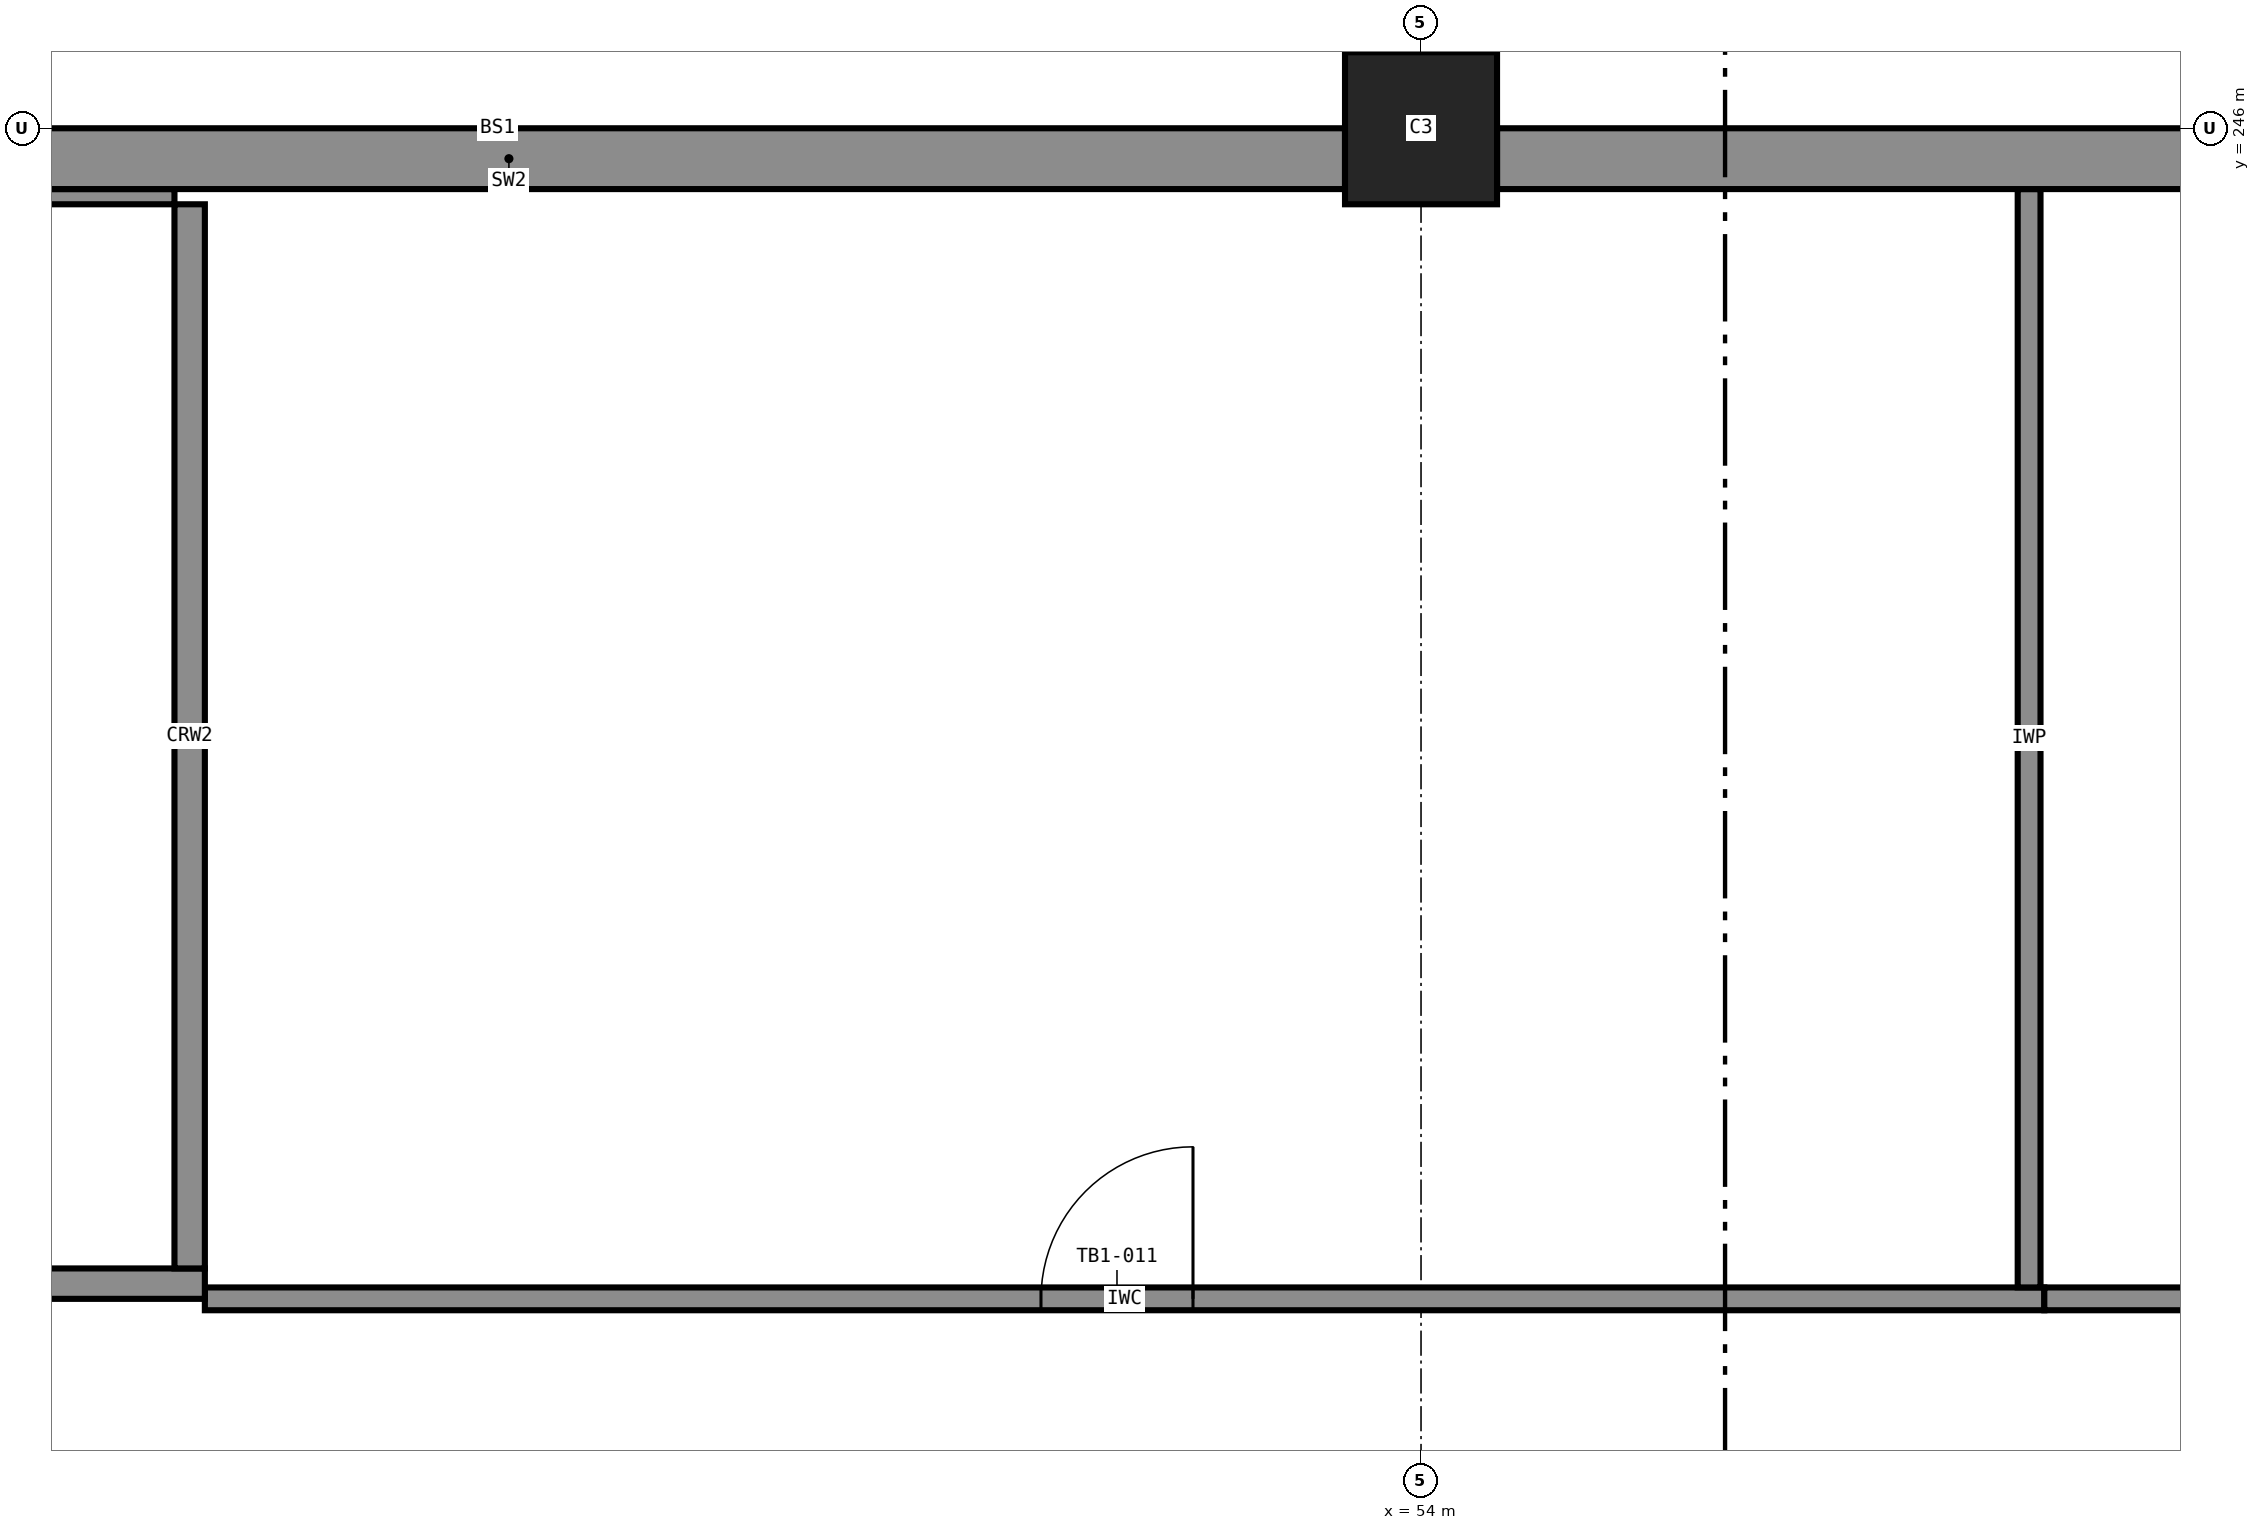
"""IFC4 building model, lengths in metres.
Left out: names, types, materials, properties, quantities, classifications, styles, units other than length and angle.
Written with IfcOpenShell. Run it as: python <this file> out.ifc"""

import sys

from ifc_helpers import new_model, si_unit, direction, frame, frame_2d, origin, origin_2d, place, context, subcontext, project, spatial, rectangle, extrude, element, fill, save


model = new_model("IFC4")
c1 = context("Model", 3, precision=1e-05, world=origin(), true_north=direction((0.0, 1.0)))
c2 = subcontext(c1, "Body", "Model", "MODEL_VIEW")
j1 = project(units=[si_unit("LENGTHUNIT", "METRE"), si_unit("PLANEANGLEUNIT", "RADIAN")], contexts=[c1])
p1 = place(None, origin())
s1 = spatial("IfcSite", under=j1, at=p1, CompositionType="ELEMENT")
p2 = place(p1, origin())
s2 = spatial("IfcBuilding", under=s1, at=p2, CompositionType="ELEMENT")
p3 = place(p2, frame((0.0, 0.0, -6.0)))
s3 = spatial("IfcBuildingStorey", under=s2, at=p3, CompositionType="ELEMENT", Elevation=-6.0)
p4 = place(p3, frame((54.0, 246.0, -0.4), z_axis=(0.0, 0.0, 1.0), x_axis=(1.0, 0.0, 0.0)))
e1 = element("IfcColumn", 1, at=p4, inside=s3, PredefinedType="COLUMN", context=c2, shape_type="SweptSolid", body=[
    extrude(rectangle(XDim=1.0, YDim=1.0, at=origin_2d()), origin(), (0.0, 0.0, 1.0), 6.4),
])
p5 = place(p3, frame((42.5, 238.4, 0.0), z_axis=(0.0, 0.0, 1.0), x_axis=(1.0, 0.0, 0.0)))
e2 = element("IfcWall", 2, at=p5, inside=s3, PredefinedType="SHEAR", context=c2, shape_type="SweptSolid", body=[
    extrude(rectangle(XDim=3.5, YDim=0.2, at=frame_2d((1.75, 0.0))), origin(), (0.0, 0.0, 1.0), 5.7),
])
p6 = place(p5, frame((1.3, 0.0, 0.0)))
e3 = element("IfcOpeningElement", 3, at=p6, cuts=e2, PredefinedType="OPENING", context=c2, shape_type="SweptSolid", body=[
    extrude(rectangle(XDim=0.9, YDim=2.1, at=frame_2d((0.45, 1.05))), frame((0.0, 0.11, 0.0), z_axis=(0.0, -1.0, 0.0), x_axis=(1.0, 0.0, 0.0)), (0.0, 0.0, 1.0), 0.22),
])
p7 = place(p3, frame((45.9, 238.5, 0.0), z_axis=(0.0, 0.0, 1.0), x_axis=(0.0, 1.0, 0.0)))
e4 = element("IfcWall", 4, at=p7, inside=s3, PredefinedType="SHEAR", context=c2, shape_type="SweptSolid", body=[
    extrude(rectangle(XDim=7.0, YDim=0.2, at=frame_2d((3.5, 0.0))), origin(), (0.0, 0.0, 1.0), 5.7),
])
p8 = place(p3, frame((42.5, 245.55, 0.0), z_axis=(0.0, 0.0, 1.0), x_axis=(1.0, 0.0, 0.0)))
e5 = element("IfcWall", 5, at=p8, inside=s3, PredefinedType="SHEAR", context=c2, shape_type="SweptSolid", body=[
    extrude(rectangle(XDim=3.3, YDim=0.1, at=frame_2d((1.65, 0.0))), origin(), (0.0, 0.0, 1.0), 5.7),
])
for number, where, z_axis, x_axis in (
    (6, (42.5, 245.8, 0.0), (0.0, 0.0, 1.0), (1.0, 0.0, 0.0)),
    (7, (54.5, 245.8, 0.0), (0.0, 0.0, 1.0), (1.0, 0.0, 0.0)),
):
    element("IfcWall", number, at=place(p3, frame(where, z_axis=z_axis, x_axis=x_axis)), inside=s3, PredefinedType="SOLIDWALL", context=c2, shape_type="SweptSolid", body=[
        extrude(rectangle(XDim=11.0, YDim=0.4, at=frame_2d((5.5, 0.0))), origin(), (0.0, 0.0, 1.0), 5.7),
    ])
p9 = place(p3, frame((46.0, 238.3, 0.0), z_axis=(0.0, 0.0, 1.0), x_axis=(1.0, 0.0, 0.0)))
e8 = element("IfcWall", 8, at=p9, inside=s3, PredefinedType="PARTITIONING", context=c2, shape_type="SweptSolid", body=[
    extrude(rectangle(XDim=12.1, YDim=0.15, at=frame_2d((6.05, 0.0))), origin(), (0.0, 0.0, 1.0), 5.7),
])
p10 = place(p9, frame((5.5, 0.0, 0.0)))
e9 = element("IfcOpeningElement", 9, at=p10, cuts=e8, PredefinedType="OPENING", context=c2, shape_type="SweptSolid", body=[
    extrude(rectangle(XDim=1.0, YDim=2.1, at=frame_2d((0.5, 1.05))), frame((0.0, 0.085, 0.0), z_axis=(0.0, -1.0, 0.0), x_axis=(1.0, 0.0, 0.0)), (0.0, 0.0, 1.0), 0.17),
])
p11 = place(p3, frame((58.1, 238.3, 0.0), z_axis=(0.0, 0.0, 1.0), x_axis=(1.0, 0.0, 0.0)))
e10 = element("IfcWall", 10, at=p11, inside=s3, PredefinedType="PARTITIONING", context=c2, shape_type="SweptSolid", body=[
    extrude(rectangle(XDim=12.0, YDim=0.15, at=frame_2d((6.0, 0.0))), origin(), (0.0, 0.0, 1.0), 5.7),
])
p12 = place(p11, frame((5.45, 0.0, 0.0)))
e11 = element("IfcOpeningElement", 11, at=p12, cuts=e10, PredefinedType="OPENING", context=c2, shape_type="SweptSolid", body=[
    extrude(rectangle(XDim=0.9, YDim=2.1, at=frame_2d((0.45, 1.05))), frame((0.0, 0.085, 0.0), z_axis=(0.0, -1.0, 0.0), x_axis=(1.0, 0.0, 0.0)), (0.0, 0.0, 1.0), 0.17),
])
p13 = place(p3, frame((58.0, 245.6, 0.0), z_axis=(0.0, 0.0, 1.0), x_axis=(0.0, -1.0, 0.0)))
e12 = element("IfcWall", 12, at=p13, inside=s3, PredefinedType="PARTITIONING", context=c2, shape_type="SweptSolid", body=[
    extrude(rectangle(XDim=7.225, YDim=0.15, at=frame_2d((3.613, 0.0))), origin(), (0.0, 0.0, 1.0), 5.7),
])
p14 = place(p10, origin())
e13 = element("IfcDoor", 13, at=p14, inside=s3, OperationType="SINGLE_SWING_RIGHT", PredefinedType="DOOR", context=c2, shape_type="SweptSolid", body=[
    extrude(rectangle(XDim=1.0, YDim=2.1, at=frame_2d((0.5, 1.05))), frame((0.0, 0.025, 0.0), z_axis=(0.0, -1.0, 0.0), x_axis=(1.0, 0.0, 0.0)), (0.0, 0.0, 1.0), 0.05),
])
fill(e9, e13)
save(model, sys.argv[1])
